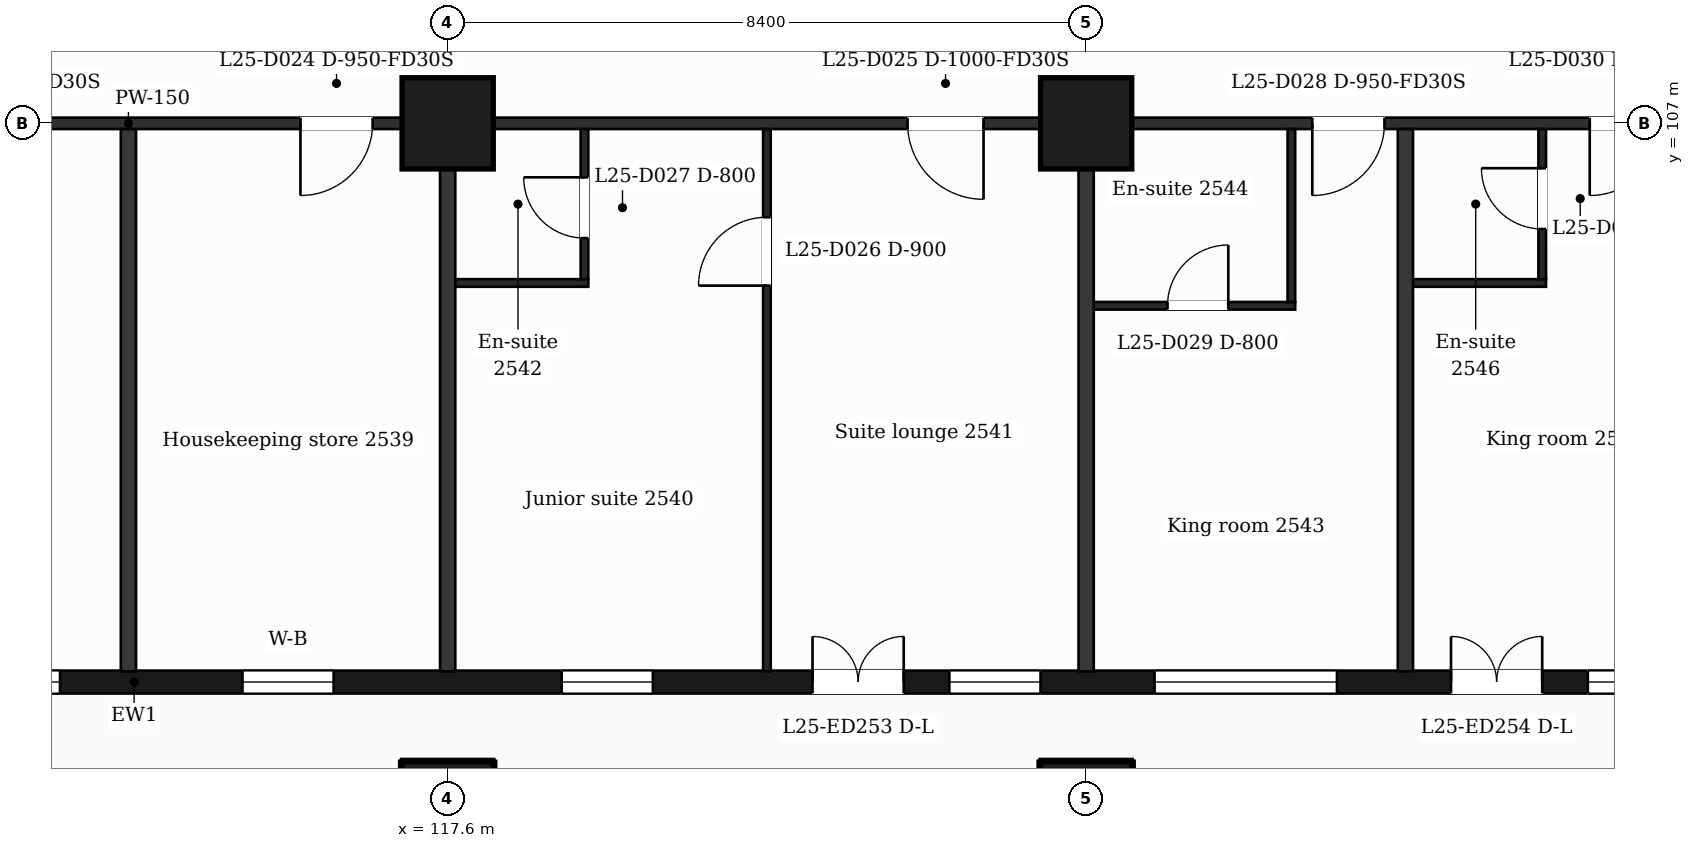
"""IFC4 building model, lengths in metres.
Left out: names, types, materials, properties, quantities, classifications, styles, units other than length and angle.
Written with IfcOpenShell. Run it as: python <this file> out.ifc"""

import sys

from ifc_helpers import new_model, si_unit, direction, frame, frame_2d, origin, origin_2d, place, context, subcontext, project, spatial, rectangle, extrude, element, fill, save


model = new_model("IFC4")
c1 = context("Model", 3, precision=1e-05, world=origin(), true_north=direction((0.0, 1.0)))
c2 = subcontext(c1, "Body", "Model", "MODEL_VIEW")
j1 = project(units=[si_unit("LENGTHUNIT", "METRE"), si_unit("PLANEANGLEUNIT", "RADIAN")], contexts=[c1])
p1 = place(None, origin())
s1 = spatial("IfcSite", under=j1, at=p1, CompositionType="ELEMENT")
p2 = place(p1, origin())
s2 = spatial("IfcBuilding", under=s1, at=p2, CompositionType="ELEMENT")
p3 = place(p2, frame((0.0, 0.0, 109.5)))
s3 = spatial("IfcBuildingStorey", under=s2, at=p3, CompositionType="ELEMENT", Elevation=109.5)
for number, where, z_axis, x_axis in (
    (1, (117.6, 98.0, 0.0), (0.0, 0.0, 1.0), (1.0, 0.0, 0.0)),
    (2, (126.0, 98.0, 0.0), (0.0, 0.0, 1.0), (1.0, 0.0, 0.0)),
    (3, (117.6, 107.0, 0.0), (0.0, 0.0, 1.0), (1.0, 0.0, 0.0)),
    (4, (126.0, 107.0, 0.0), (0.0, 0.0, 1.0), (1.0, 0.0, 0.0)),
):
    element("IfcColumn", number, at=place(p3, frame(where, z_axis=z_axis, x_axis=x_axis)), inside=s3, PredefinedType="COLUMN", context=c2, shape_type="SweptSolid", body=[
        extrude(rectangle(XDim=1.2, YDim=1.2, at=origin_2d()), origin(), (0.0, 0.0, 1.0), 3.7),
    ])
p4 = place(p3, frame((89.85, 99.65, 0.0), z_axis=(0.0, 0.0, 1.0), x_axis=(1.0, 0.0, 0.0)))
e5 = element("IfcWall", 5, at=p4, inside=s3, PredefinedType="SOLIDWALL", context=c2, shape_type="SweptSolid", body=[
    extrude(rectangle(XDim=47.25, YDim=0.3, at=frame_2d((23.625, 0.0))), origin(), (0.0, 0.0, 1.0), 3.38),
])
p5 = place(p4, frame((0.725, 0.0, 0.9)))
e6 = element("IfcOpeningElement", 6, at=p5, cuts=e5, PredefinedType="OPENING", context=c2, shape_type="SweptSolid", body=[
    extrude(rectangle(XDim=1.2, YDim=2.1, at=frame_2d((0.6, 1.05))), frame((0.0, 0.16, 0.0), z_axis=(0.0, -1.0, 0.0), x_axis=(1.0, 0.0, 0.0)), (0.0, 0.0, 1.0), 0.32),
])
p6 = place(p4, frame((3.45, 0.0, 0.9)))
e7 = element("IfcOpeningElement", 7, at=p6, cuts=e5, PredefinedType="OPENING", context=c2, shape_type="SweptSolid", body=[
    extrude(rectangle(XDim=2.4, YDim=2.1, at=frame_2d((1.2, 1.05))), frame((0.0, 0.16, 0.0), z_axis=(0.0, -1.0, 0.0), x_axis=(1.0, 0.0, 0.0)), (0.0, 0.0, 1.0), 0.32),
])
p7 = place(p4, frame((7.65, 0.0, 0.9)))
e8 = element("IfcOpeningElement", 8, at=p7, cuts=e5, PredefinedType="OPENING", context=c2, shape_type="SweptSolid", body=[
    extrude(rectangle(XDim=2.4, YDim=2.1, at=frame_2d((1.2, 1.05))), frame((0.0, 0.16, 0.0), z_axis=(0.0, -1.0, 0.0), x_axis=(1.0, 0.0, 0.0)), (0.0, 0.0, 1.0), 0.32),
])
p8 = place(p4, frame((11.85, 0.0, 0.9)))
e9 = element("IfcOpeningElement", 9, at=p8, cuts=e5, PredefinedType="OPENING", context=c2, shape_type="SweptSolid", body=[
    extrude(rectangle(XDim=2.4, YDim=2.1, at=frame_2d((1.2, 1.05))), frame((0.0, 0.16, 0.0), z_axis=(0.0, -1.0, 0.0), x_axis=(1.0, 0.0, 0.0)), (0.0, 0.0, 1.0), 0.32),
])
p9 = place(p4, frame((16.05, 0.0, 0.9)))
e10 = element("IfcOpeningElement", 10, at=p9, cuts=e5, PredefinedType="OPENING", context=c2, shape_type="SweptSolid", body=[
    extrude(rectangle(XDim=2.4, YDim=2.1, at=frame_2d((1.2, 1.05))), frame((0.0, 0.16, 0.0), z_axis=(0.0, -1.0, 0.0), x_axis=(1.0, 0.0, 0.0)), (0.0, 0.0, 1.0), 0.32),
])
p10 = place(p4, frame((20.25, 0.0, 0.9)))
e11 = element("IfcOpeningElement", 11, at=p10, cuts=e5, PredefinedType="OPENING", context=c2, shape_type="SweptSolid", body=[
    extrude(rectangle(XDim=2.4, YDim=2.1, at=frame_2d((1.2, 1.05))), frame((0.0, 0.16, 0.0), z_axis=(0.0, -1.0, 0.0), x_axis=(1.0, 0.0, 0.0)), (0.0, 0.0, 1.0), 0.32),
])
p11 = place(p4, frame((25.05, 0.0, 0.9)))
e12 = element("IfcOpeningElement", 12, at=p11, cuts=e5, PredefinedType="OPENING", context=c2, shape_type="SweptSolid", body=[
    extrude(rectangle(XDim=1.2, YDim=2.1, at=frame_2d((0.6, 1.05))), frame((0.0, 0.16, 0.0), z_axis=(0.0, -1.0, 0.0), x_axis=(1.0, 0.0, 0.0)), (0.0, 0.0, 1.0), 0.32),
])
p12 = place(p4, frame((29.25, 0.0, 0.9)))
e13 = element("IfcOpeningElement", 13, at=p12, cuts=e5, PredefinedType="OPENING", context=c2, shape_type="SweptSolid", body=[
    extrude(rectangle(XDim=1.2, YDim=2.1, at=frame_2d((0.6, 1.05))), frame((0.0, 0.16, 0.0), z_axis=(0.0, -1.0, 0.0), x_axis=(1.0, 0.0, 0.0)), (0.0, 0.0, 1.0), 0.32),
])
p13 = place(p4, frame((32.55, 0.0, 0.0)))
e14 = element("IfcOpeningElement", 14, at=p13, cuts=e5, PredefinedType="OPENING", context=c2, shape_type="SweptSolid", body=[
    extrude(rectangle(XDim=1.2, YDim=2.4, at=frame_2d((0.6, 1.2))), frame((0.0, 0.16, 0.0), z_axis=(0.0, -1.0, 0.0), x_axis=(1.0, 0.0, 0.0)), (0.0, 0.0, 1.0), 0.32),
])
p14 = place(p4, frame((34.35, 0.0, 0.9)))
e15 = element("IfcOpeningElement", 15, at=p14, cuts=e5, PredefinedType="OPENING", context=c2, shape_type="SweptSolid", body=[
    extrude(rectangle(XDim=1.2, YDim=2.1, at=frame_2d((0.6, 1.05))), frame((0.0, 0.16, 0.0), z_axis=(0.0, -1.0, 0.0), x_axis=(1.0, 0.0, 0.0)), (0.0, 0.0, 1.0), 0.32),
])
p15 = place(p4, frame((37.05, 0.0, 0.9)))
e16 = element("IfcOpeningElement", 16, at=p15, cuts=e5, PredefinedType="OPENING", context=c2, shape_type="SweptSolid", body=[
    extrude(rectangle(XDim=2.4, YDim=2.1, at=frame_2d((1.2, 1.05))), frame((0.0, 0.16, 0.0), z_axis=(0.0, -1.0, 0.0), x_axis=(1.0, 0.0, 0.0)), (0.0, 0.0, 1.0), 0.32),
])
p16 = place(p4, frame((40.95, 0.0, 0.0)))
e17 = element("IfcOpeningElement", 17, at=p16, cuts=e5, PredefinedType="OPENING", context=c2, shape_type="SweptSolid", body=[
    extrude(rectangle(XDim=1.2, YDim=2.4, at=frame_2d((0.6, 1.2))), frame((0.0, 0.16, 0.0), z_axis=(0.0, -1.0, 0.0), x_axis=(1.0, 0.0, 0.0)), (0.0, 0.0, 1.0), 0.32),
])
p17 = place(p4, frame((42.75, 0.0, 0.9)))
e18 = element("IfcOpeningElement", 18, at=p17, cuts=e5, PredefinedType="OPENING", context=c2, shape_type="SweptSolid", body=[
    extrude(rectangle(XDim=1.2, YDim=2.1, at=frame_2d((0.6, 1.05))), frame((0.0, 0.16, 0.0), z_axis=(0.0, -1.0, 0.0), x_axis=(1.0, 0.0, 0.0)), (0.0, 0.0, 1.0), 0.32),
])
p18 = place(p4, frame((45.25, 0.0, 0.9)))
e19 = element("IfcOpeningElement", 19, at=p18, cuts=e5, PredefinedType="OPENING", context=c2, shape_type="SweptSolid", body=[
    extrude(rectangle(XDim=1.2, YDim=2.1, at=frame_2d((0.6, 1.05))), frame((0.0, 0.16, 0.0), z_axis=(0.0, -1.0, 0.0), x_axis=(1.0, 0.0, 0.0)), (0.0, 0.0, 1.0), 0.32),
])
p19 = place(p3, frame((126.0, 104.6, 0.0), z_axis=(0.0, 0.0, 1.0), x_axis=(1.0, 0.0, 0.0)))
e20 = element("IfcWall", 20, at=p19, inside=s3, PredefinedType="PARTITIONING", context=c2, shape_type="SweptSolid", body=[
    extrude(rectangle(XDim=2.75, YDim=0.1, at=frame_2d((1.375, 0.0))), origin(), (0.0, 0.0, 1.0), 3.38),
])
p20 = place(p19, frame((1.07, 0.0, 0.0)))
e21 = element("IfcOpeningElement", 21, at=p20, cuts=e20, PredefinedType="OPENING", context=c2, shape_type="SweptSolid", body=[
    extrude(rectangle(XDim=0.8, YDim=2.1, at=frame_2d((0.4, 1.05))), frame((0.0, 0.06, 0.0), z_axis=(0.0, -1.0, 0.0), x_axis=(1.0, 0.0, 0.0)), (0.0, 0.0, 1.0), 0.12),
])
p21 = place(p3, frame((117.6, 104.9, 0.0), z_axis=(0.0, 0.0, 1.0), x_axis=(1.0, 0.0, 0.0)))
e22 = element("IfcWall", 22, at=p21, inside=s3, PredefinedType="PARTITIONING", context=c2, shape_type="SweptSolid", body=[
    extrude(rectangle(XDim=1.85, YDim=0.1, at=frame_2d((0.925, 0.0))), origin(), (0.0, 0.0, 1.0), 3.38),
])
p22 = place(p3, frame((130.2, 104.9, 0.0), z_axis=(0.0, 0.0, 1.0), x_axis=(1.0, 0.0, 0.0)))
e23 = element("IfcWall", 23, at=p22, inside=s3, PredefinedType="PARTITIONING", context=c2, shape_type="SweptSolid", body=[
    extrude(rectangle(XDim=1.85, YDim=0.1, at=frame_2d((0.925, 0.0))), origin(), (0.0, 0.0, 1.0), 3.38),
])
p23 = place(p3, frame((87.018, 107.0, 0.0), z_axis=(0.0, 0.0, 1.0), x_axis=(1.0, 0.0, 0.0)))
e24 = element("IfcWall", 24, at=p23, inside=s3, PredefinedType="PARTITIONING", context=c2, shape_type="SweptSolid", body=[
    extrude(rectangle(XDim=52.765, YDim=0.15, at=frame_2d((26.382, 0.0))), origin(), (0.0, 0.0, 1.0), 3.38),
])
p24 = place(p23, frame((1.032, 0.0, 0.0)))
e25 = element("IfcOpeningElement", 25, at=p24, cuts=e24, PredefinedType="OPENING", context=c2, shape_type="SweptSolid", body=[
    extrude(rectangle(XDim=0.95, YDim=2.1, at=frame_2d((0.475, 1.05))), frame((0.0, 0.085, 0.0), z_axis=(0.0, -1.0, 0.0), x_axis=(1.0, 0.0, 0.0)), (0.0, 0.0, 1.0), 0.17),
])
p25 = place(p23, frame((9.752, 0.0, 0.0)))
e26 = element("IfcOpeningElement", 26, at=p25, cuts=e24, PredefinedType="OPENING", context=c2, shape_type="SweptSolid", body=[
    extrude(rectangle(XDim=1.0, YDim=2.1, at=frame_2d((0.5, 1.05))), frame((0.0, 0.085, 0.0), z_axis=(0.0, -1.0, 0.0), x_axis=(1.0, 0.0, 0.0)), (0.0, 0.0, 1.0), 0.17),
])
p26 = place(p23, frame((23.995, 0.0, 0.0)))
e27 = element("IfcOpeningElement", 27, at=p26, cuts=e24, PredefinedType="OPENING", context=c2, shape_type="SweptSolid", body=[
    extrude(rectangle(XDim=0.95, YDim=2.1, at=frame_2d((0.475, 1.05))), frame((0.0, 0.085, 0.0), z_axis=(0.0, -1.0, 0.0), x_axis=(1.0, 0.0, 0.0)), (0.0, 0.0, 1.0), 0.17),
])
p27 = place(p23, frame((28.645, 0.0, 0.0)))
e28 = element("IfcOpeningElement", 28, at=p27, cuts=e24, PredefinedType="OPENING", context=c2, shape_type="SweptSolid", body=[
    extrude(rectangle(XDim=0.95, YDim=2.1, at=frame_2d((0.475, 1.05))), frame((0.0, 0.085, 0.0), z_axis=(0.0, -1.0, 0.0), x_axis=(1.0, 0.0, 0.0)), (0.0, 0.0, 1.0), 0.17),
])
p28 = place(p23, frame((36.632, 0.0, 0.0)))
e29 = element("IfcOpeningElement", 29, at=p28, cuts=e24, PredefinedType="OPENING", context=c2, shape_type="SweptSolid", body=[
    extrude(rectangle(XDim=1.0, YDim=2.1, at=frame_2d((0.5, 1.05))), frame((0.0, 0.085, 0.0), z_axis=(0.0, -1.0, 0.0), x_axis=(1.0, 0.0, 0.0)), (0.0, 0.0, 1.0), 0.17),
])
p29 = place(p23, frame((41.957, 0.0, 0.0)))
e30 = element("IfcOpeningElement", 30, at=p29, cuts=e24, PredefinedType="OPENING", context=c2, shape_type="SweptSolid", body=[
    extrude(rectangle(XDim=0.95, YDim=2.1, at=frame_2d((0.475, 1.05))), frame((0.0, 0.085, 0.0), z_axis=(0.0, -1.0, 0.0), x_axis=(1.0, 0.0, 0.0)), (0.0, 0.0, 1.0), 0.17),
])
p30 = place(p23, frame((45.607, 0.0, 0.0)))
e31 = element("IfcOpeningElement", 31, at=p30, cuts=e24, PredefinedType="OPENING", context=c2, shape_type="SweptSolid", body=[
    extrude(rectangle(XDim=0.95, YDim=2.1, at=frame_2d((0.475, 1.05))), frame((0.0, 0.085, 0.0), z_axis=(0.0, -1.0, 0.0), x_axis=(1.0, 0.0, 0.0)), (0.0, 0.0, 1.0), 0.17),
])
p31 = place(p23, frame((48.767, 0.0, 0.0)))
e32 = element("IfcOpeningElement", 32, at=p31, cuts=e24, PredefinedType="OPENING", context=c2, shape_type="SweptSolid", body=[
    extrude(rectangle(XDim=0.95, YDim=2.1, at=frame_2d((0.475, 1.05))), frame((0.0, 0.085, 0.0), z_axis=(0.0, -1.0, 0.0), x_axis=(1.0, 0.0, 0.0)), (0.0, 0.0, 1.0), 0.17),
])
for number, where, z_axis, x_axis in (
    (33, (113.4, 99.79, 0.0), (0.0, 0.0, 1.0), (0.0, 1.0, 0.0)),
    (34, (117.6, 99.79, 0.0), (0.0, 0.0, 1.0), (0.0, 1.0, 0.0)),
):
    element("IfcWall", number, at=place(p3, frame(where, z_axis=z_axis, x_axis=x_axis)), inside=s3, PredefinedType="PARTITIONING", context=c2, shape_type="SweptSolid", body=[
        extrude(rectangle(XDim=7.135, YDim=0.2, at=frame_2d((3.567, 0.0))), origin(), (0.0, 0.0, 1.0), 3.38),
    ])
p32 = place(p3, frame((119.4, 104.95, 0.0), z_axis=(0.0, 0.0, 1.0), x_axis=(0.0, 1.0, 0.0)))
e35 = element("IfcWall", 35, at=p32, inside=s3, PredefinedType="PARTITIONING", context=c2, shape_type="SweptSolid", body=[
    extrude(rectangle(XDim=1.975, YDim=0.1, at=frame_2d((0.988, 0.0))), origin(), (0.0, 0.0, 1.0), 3.38),
])
p33 = place(p32, frame((0.54, 0.0, 0.0)))
e36 = element("IfcOpeningElement", 36, at=p33, cuts=e35, PredefinedType="OPENING", context=c2, shape_type="SweptSolid", body=[
    extrude(rectangle(XDim=0.8, YDim=2.1, at=frame_2d((0.4, 1.05))), frame((0.0, 0.06, 0.0), z_axis=(0.0, -1.0, 0.0), x_axis=(1.0, 0.0, 0.0)), (0.0, 0.0, 1.0), 0.12),
])
p34 = place(p3, frame((121.8, 99.79, 0.0), z_axis=(0.0, 0.0, 1.0), x_axis=(0.0, 1.0, 0.0)))
e37 = element("IfcWall", 37, at=p34, inside=s3, PredefinedType="PARTITIONING", context=c2, shape_type="SweptSolid", body=[
    extrude(rectangle(XDim=7.135, YDim=0.1, at=frame_2d((3.567, 0.0))), origin(), (0.0, 0.0, 1.0), 3.38),
])
p35 = place(p34, frame((5.075, 0.0, 0.0)))
e38 = element("IfcOpeningElement", 38, at=p35, cuts=e37, PredefinedType="OPENING", context=c2, shape_type="SweptSolid", body=[
    extrude(rectangle(XDim=0.9, YDim=2.1, at=frame_2d((0.45, 1.05))), frame((0.0, 0.06, 0.0), z_axis=(0.0, -1.0, 0.0), x_axis=(1.0, 0.0, 0.0)), (0.0, 0.0, 1.0), 0.12),
])
p36 = place(p3, frame((126.0, 99.79, 0.0), z_axis=(0.0, 0.0, 1.0), x_axis=(0.0, 1.0, 0.0)))
e39 = element("IfcWall", 39, at=p36, inside=s3, PredefinedType="PARTITIONING", context=c2, shape_type="SweptSolid", body=[
    extrude(rectangle(XDim=7.135, YDim=0.2, at=frame_2d((3.567, 0.0))), origin(), (0.0, 0.0, 1.0), 3.38),
])
p37 = place(p3, frame((128.7, 104.65, 0.0), z_axis=(0.0, 0.0, 1.0), x_axis=(0.0, 1.0, 0.0)))
e40 = element("IfcWall", 40, at=p37, inside=s3, PredefinedType="PARTITIONING", context=c2, shape_type="SweptSolid", body=[
    extrude(rectangle(XDim=2.275, YDim=0.1, at=frame_2d((1.138, 0.0))), origin(), (0.0, 0.0, 1.0), 3.38),
])
p38 = place(p3, frame((130.2, 99.79, 0.0), z_axis=(0.0, 0.0, 1.0), x_axis=(0.0, 1.0, 0.0)))
e41 = element("IfcWall", 41, at=p38, inside=s3, PredefinedType="PARTITIONING", context=c2, shape_type="SweptSolid", body=[
    extrude(rectangle(XDim=7.135, YDim=0.2, at=frame_2d((3.567, 0.0))), origin(), (0.0, 0.0, 1.0), 3.38),
])
p39 = place(p3, frame((132.0, 104.95, 0.0), z_axis=(0.0, 0.0, 1.0), x_axis=(0.0, 1.0, 0.0)))
e42 = element("IfcWall", 42, at=p39, inside=s3, PredefinedType="PARTITIONING", context=c2, shape_type="SweptSolid", body=[
    extrude(rectangle(XDim=1.975, YDim=0.1, at=frame_2d((0.988, 0.0))), origin(), (0.0, 0.0, 1.0), 3.38),
])
p40 = place(p39, frame((0.66, 0.0, 0.0)))
e43 = element("IfcOpeningElement", 43, at=p40, cuts=e42, PredefinedType="OPENING", context=c2, shape_type="SweptSolid", body=[
    extrude(rectangle(XDim=0.8, YDim=2.1, at=frame_2d((0.4, 1.05))), frame((0.0, 0.06, 0.0), z_axis=(0.0, -1.0, 0.0), x_axis=(1.0, 0.0, 0.0)), (0.0, 0.0, 1.0), 0.12),
])
p41 = place(p10, origin())
e44 = element("IfcWindow", 44, at=p41, inside=s3, PartitioningType="SINGLE_PANEL", PredefinedType="WINDOW", context=c2, shape_type="SweptSolid", body=[
    extrude(rectangle(XDim=2.4, YDim=2.1, at=frame_2d((1.2, 1.05))), frame((0.0, 0.03, 0.0), z_axis=(0.0, -1.0, 0.0), x_axis=(1.0, 0.0, 0.0)), (0.0, 0.0, 1.0), 0.06),
])
fill(e11, e44)
p42 = place(p11, origin())
e45 = element("IfcWindow", 45, at=p42, inside=s3, PartitioningType="SINGLE_PANEL", PredefinedType="WINDOW", context=c2, shape_type="SweptSolid", body=[
    extrude(rectangle(XDim=1.2, YDim=2.1, at=frame_2d((0.6, 1.05))), frame((0.0, 0.03, 0.0), z_axis=(0.0, -1.0, 0.0), x_axis=(1.0, 0.0, 0.0)), (0.0, 0.0, 1.0), 0.06),
])
fill(e12, e45)
p43 = place(p12, origin())
e46 = element("IfcWindow", 46, at=p43, inside=s3, PartitioningType="SINGLE_PANEL", PredefinedType="WINDOW", context=c2, shape_type="SweptSolid", body=[
    extrude(rectangle(XDim=1.2, YDim=2.1, at=frame_2d((0.6, 1.05))), frame((0.0, 0.03, 0.0), z_axis=(0.0, -1.0, 0.0), x_axis=(1.0, 0.0, 0.0)), (0.0, 0.0, 1.0), 0.06),
])
fill(e13, e46)
p44 = place(p13, origin())
e47 = element("IfcDoor", 47, at=p44, inside=s3, OperationType="DOUBLE_DOOR_SINGLE_SWING", PredefinedType="DOOR", context=c2, shape_type="SweptSolid", body=[
    extrude(rectangle(XDim=1.2, YDim=2.4, at=frame_2d((0.6, 1.2))), frame((0.0, 0.025, 0.0), z_axis=(0.0, -1.0, 0.0), x_axis=(1.0, 0.0, 0.0)), (0.0, 0.0, 1.0), 0.05),
])
fill(e14, e47)
p45 = place(p14, origin())
e48 = element("IfcWindow", 48, at=p45, inside=s3, PartitioningType="SINGLE_PANEL", PredefinedType="WINDOW", context=c2, shape_type="SweptSolid", body=[
    extrude(rectangle(XDim=1.2, YDim=2.1, at=frame_2d((0.6, 1.05))), frame((0.0, 0.03, 0.0), z_axis=(0.0, -1.0, 0.0), x_axis=(1.0, 0.0, 0.0)), (0.0, 0.0, 1.0), 0.06),
])
fill(e15, e48)
p46 = place(p15, origin())
e49 = element("IfcWindow", 49, at=p46, inside=s3, PartitioningType="SINGLE_PANEL", PredefinedType="WINDOW", context=c2, shape_type="SweptSolid", body=[
    extrude(rectangle(XDim=2.4, YDim=2.1, at=frame_2d((1.2, 1.05))), frame((0.0, 0.03, 0.0), z_axis=(0.0, -1.0, 0.0), x_axis=(1.0, 0.0, 0.0)), (0.0, 0.0, 1.0), 0.06),
])
fill(e16, e49)
p47 = place(p16, origin())
e50 = element("IfcDoor", 50, at=p47, inside=s3, OperationType="DOUBLE_DOOR_SINGLE_SWING", PredefinedType="DOOR", context=c2, shape_type="SweptSolid", body=[
    extrude(rectangle(XDim=1.2, YDim=2.4, at=frame_2d((0.6, 1.2))), frame((0.0, 0.025, 0.0), z_axis=(0.0, -1.0, 0.0), x_axis=(1.0, 0.0, 0.0)), (0.0, 0.0, 1.0), 0.05),
])
fill(e17, e50)
p48 = place(p17, origin())
e51 = element("IfcWindow", 51, at=p48, inside=s3, PartitioningType="SINGLE_PANEL", PredefinedType="WINDOW", context=c2, shape_type="SweptSolid", body=[
    extrude(rectangle(XDim=1.2, YDim=2.1, at=frame_2d((0.6, 1.05))), frame((0.0, 0.03, 0.0), z_axis=(0.0, -1.0, 0.0), x_axis=(1.0, 0.0, 0.0)), (0.0, 0.0, 1.0), 0.06),
])
fill(e18, e51)
p49 = place(p27, origin())
e52 = element("IfcDoor", 52, at=p49, inside=s3, OperationType="SINGLE_SWING_LEFT", PredefinedType="DOOR", context=c2, shape_type="SweptSolid", body=[
    extrude(rectangle(XDim=0.95, YDim=2.1, at=frame_2d((0.475, 1.05))), frame((0.0, 0.025, 0.0), z_axis=(0.0, -1.0, 0.0), x_axis=(1.0, 0.0, 0.0)), (0.0, 0.0, 1.0), 0.05),
])
fill(e28, e52)
p50 = place(p28, origin())
e53 = element("IfcDoor", 53, at=p50, inside=s3, OperationType="SINGLE_SWING_RIGHT", PredefinedType="DOOR", context=c2, shape_type="SweptSolid", body=[
    extrude(rectangle(XDim=1.0, YDim=2.1, at=frame_2d((0.5, 1.05))), frame((0.0, 0.025, 0.0), z_axis=(0.0, -1.0, 0.0), x_axis=(1.0, 0.0, 0.0)), (0.0, 0.0, 1.0), 0.05),
])
fill(e29, e53)
p51 = place(p35, origin())
e54 = element("IfcDoor", 54, at=p51, inside=s3, OperationType="SINGLE_SWING_LEFT", PredefinedType="DOOR", context=c2, shape_type="SweptSolid", body=[
    extrude(rectangle(XDim=0.9, YDim=2.1, at=frame_2d((0.45, 1.05))), frame((0.0, 0.025, 0.0), z_axis=(0.0, -1.0, 0.0), x_axis=(1.0, 0.0, 0.0)), (0.0, 0.0, 1.0), 0.05),
])
fill(e38, e54)
p52 = place(p33, origin())
e55 = element("IfcDoor", 55, at=p52, inside=s3, OperationType="SINGLE_SWING_RIGHT", PredefinedType="DOOR", context=c2, shape_type="SweptSolid", body=[
    extrude(rectangle(XDim=0.8, YDim=2.1, at=frame_2d((0.4, 1.05))), frame((0.0, 0.025, 0.0), z_axis=(0.0, -1.0, 0.0), x_axis=(1.0, 0.0, 0.0)), (0.0, 0.0, 1.0), 0.05),
])
fill(e36, e55)
p53 = place(p29, origin())
e56 = element("IfcDoor", 56, at=p53, inside=s3, OperationType="SINGLE_SWING_LEFT", PredefinedType="DOOR", context=c2, shape_type="SweptSolid", body=[
    extrude(rectangle(XDim=0.95, YDim=2.1, at=frame_2d((0.475, 1.05))), frame((0.0, 0.025, 0.0), z_axis=(0.0, -1.0, 0.0), x_axis=(1.0, 0.0, 0.0)), (0.0, 0.0, 1.0), 0.05),
])
fill(e30, e56)
p54 = place(p20, origin())
e57 = element("IfcDoor", 57, at=p54, inside=s3, OperationType="SINGLE_SWING_RIGHT", PredefinedType="DOOR", context=c2, shape_type="SweptSolid", body=[
    extrude(rectangle(XDim=0.8, YDim=2.1, at=frame_2d((0.4, 1.05))), frame((0.0, 0.025, 0.0), z_axis=(0.0, -1.0, 0.0), x_axis=(1.0, 0.0, 0.0)), (0.0, 0.0, 1.0), 0.05),
])
fill(e21, e57)
p55 = place(p30, origin())
e58 = element("IfcDoor", 58, at=p55, inside=s3, OperationType="SINGLE_SWING_LEFT", PredefinedType="DOOR", context=c2, shape_type="SweptSolid", body=[
    extrude(rectangle(XDim=0.95, YDim=2.1, at=frame_2d((0.475, 1.05))), frame((0.0, 0.025, 0.0), z_axis=(0.0, -1.0, 0.0), x_axis=(1.0, 0.0, 0.0)), (0.0, 0.0, 1.0), 0.05),
])
fill(e31, e58)
p56 = place(p40, origin())
e59 = element("IfcDoor", 59, at=p56, inside=s3, OperationType="SINGLE_SWING_RIGHT", PredefinedType="DOOR", context=c2, shape_type="SweptSolid", body=[
    extrude(rectangle(XDim=0.8, YDim=2.1, at=frame_2d((0.4, 1.05))), frame((0.0, 0.025, 0.0), z_axis=(0.0, -1.0, 0.0), x_axis=(1.0, 0.0, 0.0)), (0.0, 0.0, 1.0), 0.05),
])
fill(e43, e59)
save(model, sys.argv[1])
